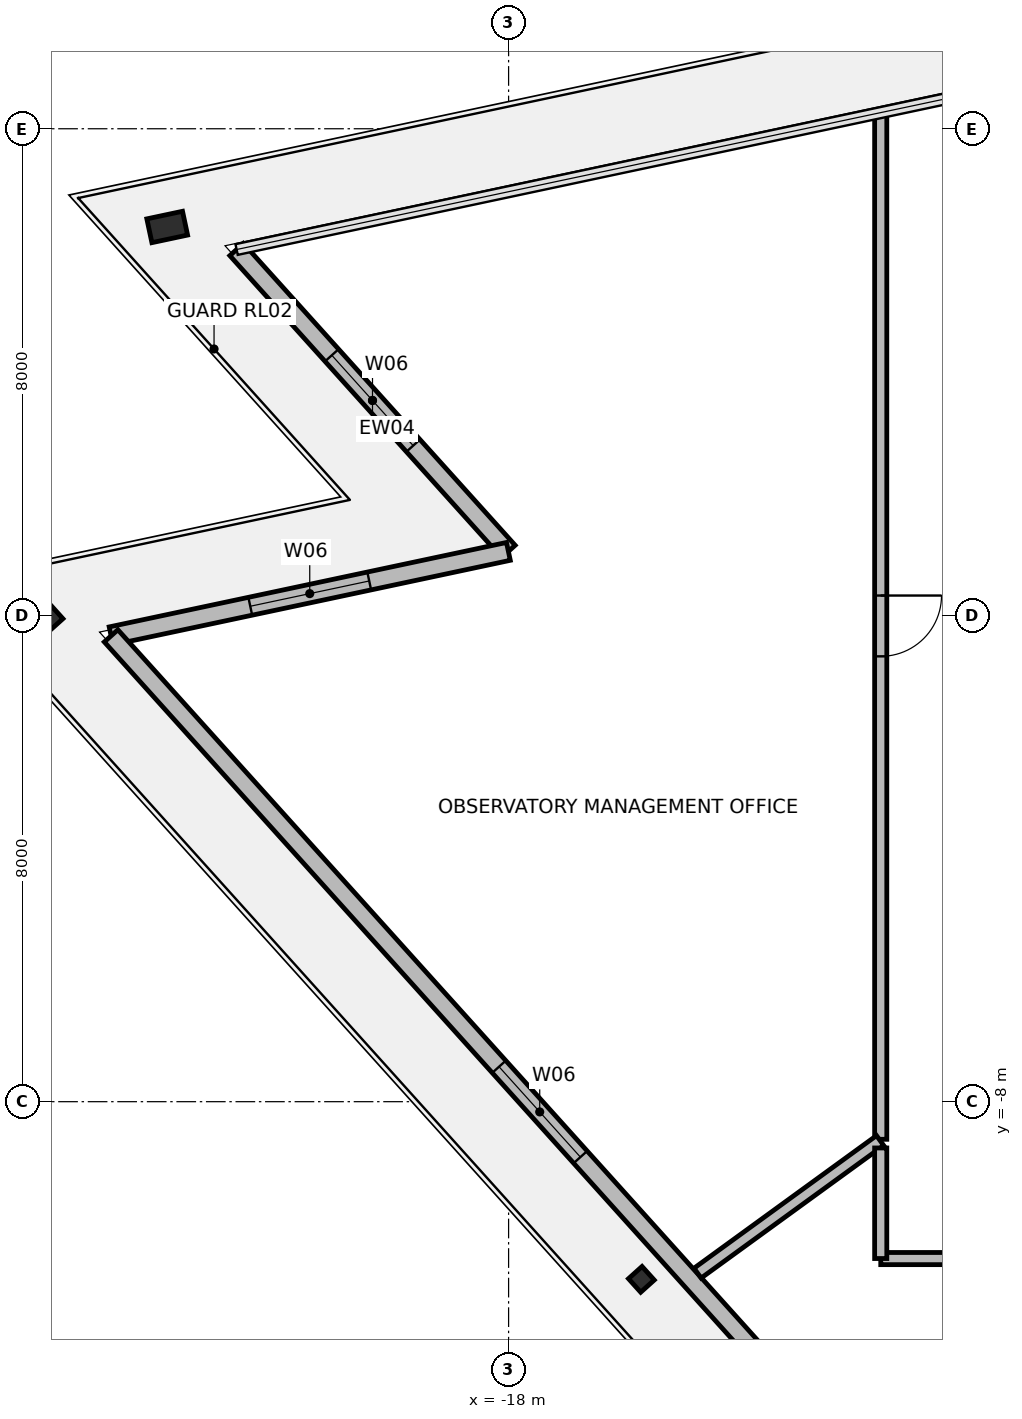
"""IFC4 building model, lengths in metres.
Left out: names, types, materials, properties, quantities, classifications, styles, units other than length and angle.
Written with IfcOpenShell. Run it as: python <this file> out.ifc"""

import sys

from ifc_helpers import new_model, si_unit, direction, frame, frame_2d, origin, origin_2d, place, context, subcontext, project, spatial, rectangle, hollow_rectangle, extrude, element, fill, save


model = new_model("IFC4")
c1 = context("Model", 3, precision=1e-05, world=origin(), true_north=direction((0.0, 1.0)))
c2 = subcontext(c1, "Body", "Model", "MODEL_VIEW")
j1 = project(units=[si_unit("LENGTHUNIT", "METRE"), si_unit("PLANEANGLEUNIT", "RADIAN")], contexts=[c1])
p1 = place(None, origin())
s1 = spatial("IfcSite", under=j1, at=p1, CompositionType="ELEMENT")
p2 = place(p1, origin())
s2 = spatial("IfcBuilding", under=s1, at=p2, CompositionType="ELEMENT")
p3 = place(p2, frame((0.0, 0.0, 306.3)))
s3 = spatial("IfcBuildingStorey", under=s2, at=p3, CompositionType="ELEMENT", Elevation=306.3)
p4 = place(p3, frame((-25.679, 0.032, 0.0), z_axis=(0.0, 0.0, 1.0), x_axis=(-0.669130606359, 0.743144825477, 0.0)))
e1 = element("IfcColumn", 1, at=p4, inside=s3, PredefinedType="COLUMN", context=c2, shape_type="SweptSolid", body=[
    extrude(hollow_rectangle(XDim=0.4, YDim=0.6, WallThickness=0.03, at=origin_2d()), origin(), (0.0, 0.0, 1.0), 4.55),
])
p5 = place(p3, frame((-15.816, -10.922, 0.0), z_axis=(0.0, 0.0, 1.0), x_axis=(-0.669130606359, 0.743144825477, 0.0)))
e2 = element("IfcColumn", 2, at=p5, inside=s3, PredefinedType="COLUMN", context=c2, shape_type="SweptSolid", body=[
    extrude(hollow_rectangle(XDim=0.3, YDim=0.3, WallThickness=0.02, at=origin_2d()), origin(), (0.0, 0.0, 1.0), 4.55),
])
p6 = place(p3, frame((-23.615, 6.385, 0.0), z_axis=(0.0, 0.0, 1.0), x_axis=(0.978147237858, 0.207913398007, 0.0)))
e3 = element("IfcColumn", 3, at=p6, inside=s3, PredefinedType="COLUMN", context=c2, shape_type="SweptSolid", body=[
    extrude(hollow_rectangle(XDim=0.4, YDim=0.6, WallThickness=0.03, at=origin_2d()), origin(), (0.0, 0.0, 1.0), 4.55),
])
p7 = place(p3, frame((-22.473, 6.014, 0.0), z_axis=(0.0, 0.0, 1.0), x_axis=(0.669114139384, -0.743159652078, 0.0)))
e4 = element("IfcWall", 4, at=p7, inside=s3, PredefinedType="STANDARD", context=c2, shape_type="SweptSolid", body=[
    extrude(rectangle(XDim=6.68, YDim=0.3, at=frame_2d((3.34, 0.0))), origin(), (0.0, 0.0, 1.0), 3.805),
])
p8 = place(p7, frame((2.34, 0.0, 0.85)))
e5 = element("IfcOpeningElement", 5, at=p8, cuts=e4, PredefinedType="OPENING", context=c2, shape_type="SweptSolid", body=[
    extrude(rectangle(XDim=2.0, YDim=2.4, at=frame_2d((1.0, 1.2))), frame((0.0, 0.16, 0.0), z_axis=(0.0, -1.0, 0.0), x_axis=(1.0, 0.0, 0.0)), (0.0, 0.0, 1.0), 0.32),
])
p9 = place(p3, frame((-18.003, 1.05, 0.0), z_axis=(0.0, 0.0, 1.0), x_axis=(-0.978152441183, -0.207888916992, 0.0)))
e6 = element("IfcWall", 6, at=p9, inside=s3, PredefinedType="STANDARD", context=c2, shape_type="SweptSolid", body=[
    extrude(rectangle(XDim=6.68, YDim=0.3, at=frame_2d((3.34, 0.0))), origin(), (0.0, 0.0, 1.0), 4.065),
])
p10 = place(p9, frame((2.34, 0.0, 0.85)))
e7 = element("IfcOpeningElement", 7, at=p10, cuts=e6, PredefinedType="OPENING", context=c2, shape_type="SweptSolid", body=[
    extrude(rectangle(XDim=2.0, YDim=2.4, at=frame_2d((1.0, 1.2))), frame((0.0, 0.16, 0.0), z_axis=(0.0, -1.0, 0.0), x_axis=(1.0, 0.0, 0.0)), (0.0, 0.0, 1.0), 0.32),
])
p11 = place(p3, frame((-24.537, -0.339, 0.0), z_axis=(0.0, 0.0, 1.0), x_axis=(0.669127961041, -0.743147207324, 0.0)))
e8 = element("IfcWall", 8, at=p11, inside=s3, PredefinedType="STANDARD", context=c2, shape_type="SweptSolid", body=[
    extrude(rectangle(XDim=42.14, YDim=0.3, at=frame_2d((21.07, 0.0))), origin(), (0.0, 0.0, 1.0), 3.805),
])
p12 = place(p11, frame((20.27, 0.0, 0.0)))
e9 = element("IfcOpeningElement", 9, at=p12, cuts=e8, PredefinedType="OPENING", context=c2, shape_type="SweptSolid", body=[
    extrude(rectangle(XDim=1.6, YDim=2.3, at=frame_2d((0.8, 1.15))), frame((0.0, 0.16, 0.0), z_axis=(0.0, -1.0, 0.0), x_axis=(1.0, 0.0, 0.0)), (0.0, 0.0, 1.0), 0.32),
])
p13 = place(p11, frame((9.535, 0.0, 0.85)))
e10 = element("IfcOpeningElement", 10, at=p13, cuts=e8, PredefinedType="OPENING", context=c2, shape_type="SweptSolid", body=[
    extrude(rectangle(XDim=2.0, YDim=2.4, at=frame_2d((1.0, 1.2))), frame((0.0, 0.16, 0.0), z_axis=(0.0, -1.0, 0.0), x_axis=(1.0, 0.0, 0.0)), (0.0, 0.0, 1.0), 0.32),
])
p14 = place(p11, frame((30.605, 0.0, 0.85)))
e11 = element("IfcOpeningElement", 11, at=p14, cuts=e8, PredefinedType="OPENING", context=c2, shape_type="SweptSolid", body=[
    extrude(rectangle(XDim=2.0, YDim=2.4, at=frame_2d((1.0, 1.2))), frame((0.0, 0.16, 0.0), z_axis=(0.0, -1.0, 0.0), x_axis=(1.0, 0.0, 0.0)), (0.0, 0.0, 1.0), 0.32),
])
p15 = place(p3, frame((-11.88, 8.266, 0.0), z_axis=(0.0, 0.0, 1.0), x_axis=(0.0, -1.0, 0.0)))
e12 = element("IfcWall", 12, at=p15, inside=s3, PredefinedType="PARTITIONING", context=c2, shape_type="SweptSolid", body=[
    extrude(rectangle(XDim=16.884, YDim=0.2, at=frame_2d((8.442, 0.0))), origin(), (0.0, 0.0, 1.0), 3.805),
])
p16 = place(p15, frame((7.942, 0.0, 0.0)))
e13 = element("IfcOpeningElement", 13, at=p16, cuts=e12, PredefinedType="OPENING", context=c2, shape_type="SweptSolid", body=[
    extrude(rectangle(XDim=1.0, YDim=2.15, at=frame_2d((0.5, 1.075))), frame((0.0, 0.11, 0.0), z_axis=(0.0, -1.0, 0.0), x_axis=(1.0, 0.0, 0.0)), (0.0, 0.0, 1.0), 0.22),
])
p17 = place(p3, frame((-11.89, -8.639, 0.0), z_axis=(0.0, 0.0, 1.0), x_axis=(-0.80904328996, -0.587749057822, 0.0)))
e14 = element("IfcWall", 14, at=p17, inside=s3, PredefinedType="PARTITIONING", context=c2, shape_type="SweptSolid", body=[
    extrude(rectangle(XDim=3.71, YDim=0.2, at=frame_2d((1.855, 0.0))), origin(), (0.0, 0.0, 1.0), 3.805),
])
p18 = place(p3, frame((-11.879, -10.58, 0.0), z_axis=(0.0, 0.0, 1.0), x_axis=(1.0, 0.0, 0.0)))
e15 = element("IfcWall", 15, at=p18, inside=s3, PredefinedType="PARTITIONING", context=c2, shape_type="SweptSolid", body=[
    extrude(rectangle(XDim=15.299, YDim=0.2, at=frame_2d((7.649, 0.0))), origin(), (0.0, 0.0, 1.0), 3.805),
])
p19 = place(p18, frame((6.849, 0.0, 0.0)))
e16 = element("IfcOpeningElement", 16, at=p19, cuts=e15, PredefinedType="OPENING", context=c2, shape_type="SweptSolid", body=[
    extrude(rectangle(XDim=1.6, YDim=2.2, at=frame_2d((0.8, 1.1))), frame((0.0, 0.11, 0.0), z_axis=(0.0, -1.0, 0.0), x_axis=(1.0, 0.0, 0.0)), (0.0, 0.0, 1.0), 0.22),
])
p20 = place(p3, frame((-11.88, -8.761, 0.0), z_axis=(0.0, 0.0, 1.0), x_axis=(0.0, -1.0, 0.0)))
e17 = element("IfcWall", 17, at=p20, inside=s3, PredefinedType="PARTITIONING", context=c2, shape_type="SweptSolid", body=[
    extrude(rectangle(XDim=1.818, YDim=0.2, at=frame_2d((0.909, 0.0))), origin(), (0.0, 0.0, 1.0), 3.805),
])
p21 = place(p8, origin())
e18 = element("IfcWindow", 18, at=p21, inside=s3, PartitioningType="SINGLE_PANEL", PredefinedType="WINDOW", context=c2, shape_type="SweptSolid", body=[
    extrude(rectangle(XDim=2.0, YDim=2.4, at=frame_2d((1.0, 1.2))), frame((0.0, 0.03, 0.0), z_axis=(0.0, -1.0, 0.0), x_axis=(1.0, 0.0, 0.0)), (0.0, 0.0, 1.0), 0.06),
])
fill(e5, e18)
p22 = place(p10, origin())
e19 = element("IfcWindow", 19, at=p22, inside=s3, PartitioningType="SINGLE_PANEL", PredefinedType="WINDOW", context=c2, shape_type="SweptSolid", body=[
    extrude(rectangle(XDim=2.0, YDim=2.4, at=frame_2d((1.0, 1.2))), frame((0.0, 0.03, 0.0), z_axis=(0.0, -1.0, 0.0), x_axis=(1.0, 0.0, 0.0)), (0.0, 0.0, 1.0), 0.06),
])
fill(e7, e19)
p23 = place(p13, origin())
e20 = element("IfcWindow", 20, at=p23, inside=s3, PartitioningType="SINGLE_PANEL", PredefinedType="WINDOW", context=c2, shape_type="SweptSolid", body=[
    extrude(rectangle(XDim=2.0, YDim=2.4, at=frame_2d((1.0, 1.2))), frame((0.0, 0.03, 0.0), z_axis=(0.0, -1.0, 0.0), x_axis=(1.0, 0.0, 0.0)), (0.0, 0.0, 1.0), 0.06),
])
fill(e10, e20)
p24 = place(p16, origin())
e21 = element("IfcDoor", 21, at=p24, inside=s3, OperationType="SINGLE_SWING_RIGHT", PredefinedType="DOOR", context=c2, shape_type="SweptSolid", body=[
    extrude(rectangle(XDim=1.0, YDim=2.15, at=frame_2d((0.5, 1.075))), frame((0.0, 0.025, 0.0), z_axis=(0.0, -1.0, 0.0), x_axis=(1.0, 0.0, 0.0)), (0.0, 0.0, 1.0), 0.05),
])
fill(e13, e21)
save(model, sys.argv[1])
